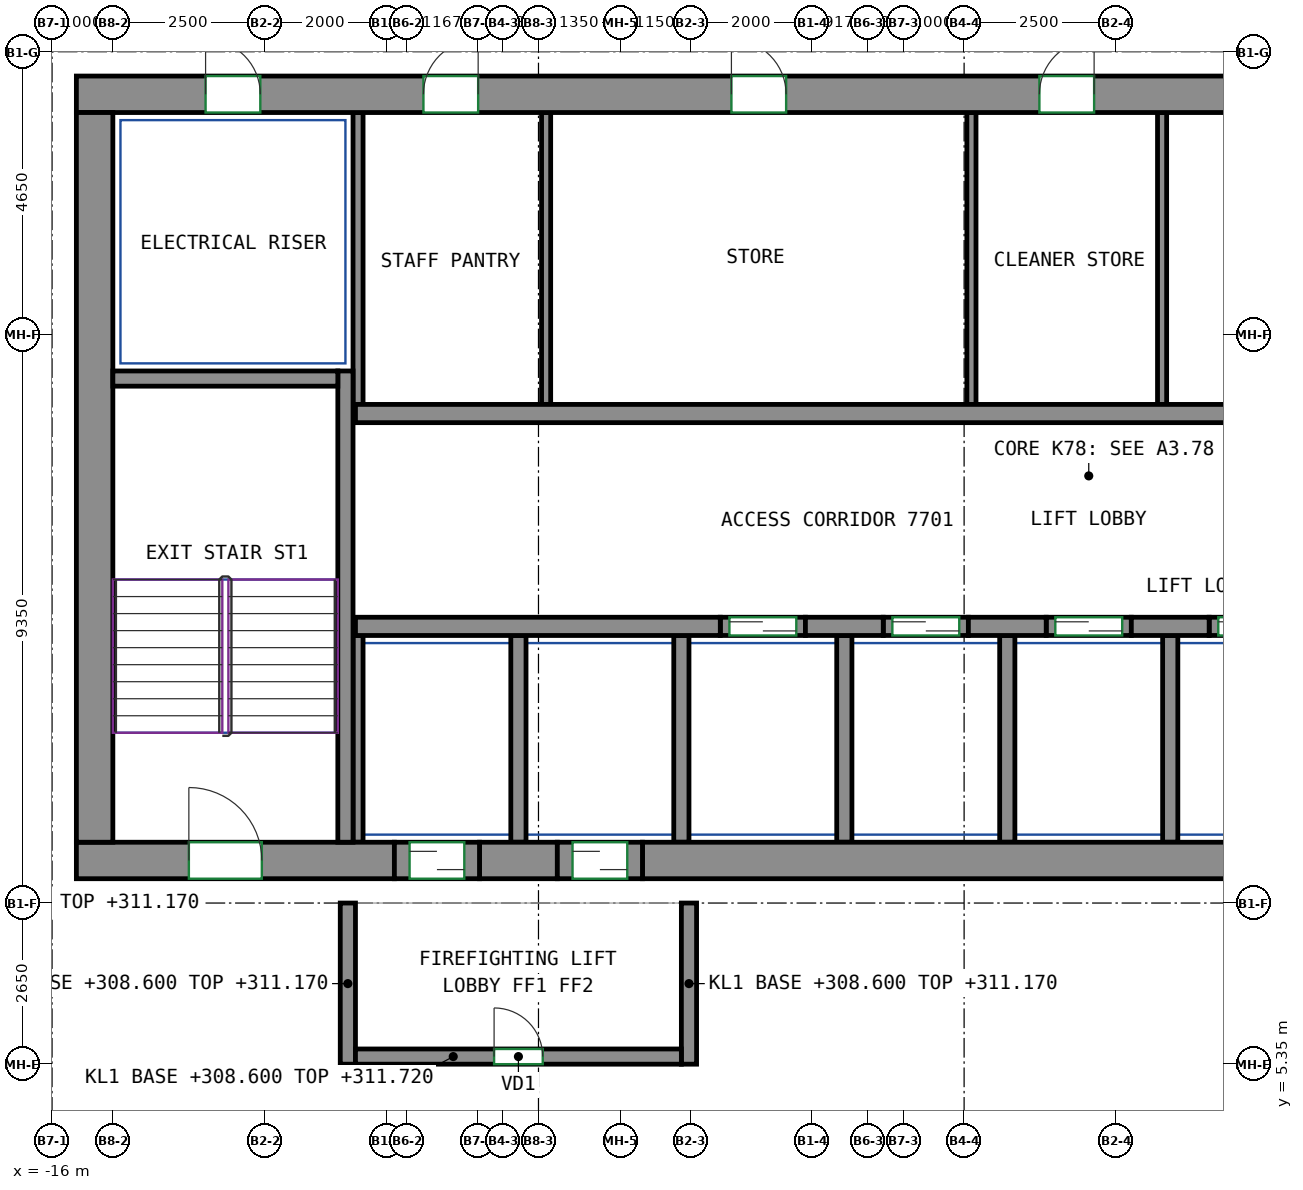
"""IFC4 building model, lengths in metres.
Left out: names, types, materials, properties, quantities, classifications, styles, units other than length and angle.
Written with IfcOpenShell. Run it as: python <this file> out.ifc"""

import sys

from ifc_helpers import new_model, si_unit, direction, frame, frame_2d, origin, place, context, subcontext, project, spatial, rectangle, extrude, source, transform, mapped, element, fill, save


model = new_model("IFC4")
c1 = context("Model", 3, precision=1e-05, world=origin(), true_north=direction((0.0, 1.0)))
c2 = subcontext(c1, "Body", "Model", "MODEL_VIEW")
j1 = project(units=[si_unit("LENGTHUNIT", "METRE"), si_unit("PLANEANGLEUNIT", "RADIAN")], contexts=[c1])
p1 = place(None, origin())
s1 = spatial("IfcSite", under=j1, at=p1, CompositionType="ELEMENT")
p2 = place(p1, origin())
s2 = spatial("IfcBuilding", under=s1, at=p2, CompositionType="ELEMENT")
p3 = place(p2, frame((0.0, 0.0, 308.6)))
s3 = spatial("IfcBuildingStorey", under=s2, at=p3, CompositionType="ELEMENT", Elevation=308.6)
m1 = source(origin(), c2, "Body", "SweptSolid", [
    extrude(rectangle(XDim=5.23, YDim=0.6, at=frame_2d((2.615, 0.0))), origin(), (0.0, 0.0, 1.0), 3.12),
])
p4 = place(p3, frame((-15.6, 8.7, 0.0), z_axis=(0.0, 0.0, 1.0), x_axis=(1.0, 0.0, 0.0)))
e1 = element("IfcWall", 1, at=p4, inside=s3, PredefinedType="SHEAR", context=c2, shape_type="MappedRepresentation", body=[
    mapped(m1, transform((0.0, 0.0, 0.0))),
])
p5 = place(p4, frame((1.85, 0.0, 0.0)))
e2 = element("IfcOpeningElement", 2, at=p5, cuts=e1, PredefinedType="OPENING", context=c2, shape_type="SweptSolid", body=[
    extrude(rectangle(XDim=1.2, YDim=2.1, at=frame_2d((0.6, 1.05))), frame((0.0, 0.31, 0.0), z_axis=(0.0, -1.0, 0.0), x_axis=(1.0, 0.0, 0.0)), (0.0, 0.0, 1.0), 0.62),
])
m2 = source(origin(), c2, "Body", "SweptSolid", [
    extrude(rectangle(XDim=1.28, YDim=0.6, at=frame_2d((0.64, 0.0))), origin(), (0.0, 0.0, 1.0), 3.12),
])
p6 = place(p3, frame((-8.97, 8.7, 0.0), z_axis=(0.0, 0.0, 1.0), x_axis=(1.0, 0.0, 0.0)))
e3 = element("IfcWall", 3, at=p6, inside=s3, PredefinedType="SHEAR", context=c2, shape_type="MappedRepresentation", body=[
    mapped(m2, transform((0.0, 0.0, 0.0))),
])
m3 = source(origin(), c2, "Body", "SweptSolid", [
    extrude(rectangle(XDim=14.18, YDim=0.6, at=frame_2d((7.09, 0.0))), origin(), (0.0, 0.0, 1.0), 3.12),
])
p7 = place(p3, frame((-6.29, 8.7, 0.0), z_axis=(0.0, 0.0, 1.0), x_axis=(1.0, 0.0, 0.0)))
e4 = element("IfcWall", 4, at=p7, inside=s3, PredefinedType="SHEAR", context=c2, shape_type="MappedRepresentation", body=[
    mapped(m3, transform((0.0, 0.0, 0.0))),
])
m4 = source(origin(), c2, "Body", "SweptSolid", [
    extrude(rectangle(XDim=33.3, YDim=0.6, at=frame_2d((16.65, 0.0))), origin(), (0.0, 0.0, 1.0), 3.12),
])
p8 = place(p3, frame((-15.6, 21.3, 0.0), z_axis=(0.0, 0.0, 1.0), x_axis=(1.0, 0.0, 0.0)))
e5 = element("IfcWall", 5, at=p8, inside=s3, PredefinedType="SHEAR", context=c2, shape_type="MappedRepresentation", body=[
    mapped(m4, transform((0.0, 0.0, 0.0))),
])
p9 = place(p8, frame((5.708, 0.0, 0.0)))
e6 = element("IfcOpeningElement", 6, at=p9, cuts=e5, PredefinedType="OPENING", context=c2, shape_type="SweptSolid", body=[
    extrude(rectangle(XDim=0.9, YDim=2.1, at=frame_2d((0.45, 1.05))), frame((0.0, 0.31, 0.0), z_axis=(0.0, -1.0, 0.0), x_axis=(1.0, 0.0, 0.0)), (0.0, 0.0, 1.0), 0.62),
])
p10 = place(p8, frame((10.773, 0.0, 0.0)))
e7 = element("IfcOpeningElement", 7, at=p10, cuts=e5, PredefinedType="OPENING", context=c2, shape_type="SweptSolid", body=[
    extrude(rectangle(XDim=0.9, YDim=2.1, at=frame_2d((0.45, 1.05))), frame((0.0, 0.31, 0.0), z_axis=(0.0, -1.0, 0.0), x_axis=(1.0, 0.0, 0.0)), (0.0, 0.0, 1.0), 0.62),
])
p11 = place(p8, frame((15.838, 0.0, 0.0)))
e8 = element("IfcOpeningElement", 8, at=p11, cuts=e5, PredefinedType="OPENING", context=c2, shape_type="SweptSolid", body=[
    extrude(rectangle(XDim=0.9, YDim=2.1, at=frame_2d((0.45, 1.05))), frame((0.0, 0.31, 0.0), z_axis=(0.0, -1.0, 0.0), x_axis=(1.0, 0.0, 0.0)), (0.0, 0.0, 1.0), 0.62),
])
p12 = place(p8, frame((21.493, 0.0, 0.0)))
e9 = element("IfcOpeningElement", 9, at=p12, cuts=e5, PredefinedType="OPENING", context=c2, shape_type="SweptSolid", body=[
    extrude(rectangle(XDim=0.9, YDim=2.1, at=frame_2d((0.45, 1.05))), frame((0.0, 0.31, 0.0), z_axis=(0.0, -1.0, 0.0), x_axis=(1.0, 0.0, 0.0)), (0.0, 0.0, 1.0), 0.62),
])
p13 = place(p8, frame((26.92, 0.0, 0.0)))
e10 = element("IfcOpeningElement", 10, at=p13, cuts=e5, PredefinedType="OPENING", context=c2, shape_type="SweptSolid", body=[
    extrude(rectangle(XDim=0.9, YDim=2.1, at=frame_2d((0.45, 1.05))), frame((0.0, 0.31, 0.0), z_axis=(0.0, -1.0, 0.0), x_axis=(1.0, 0.0, 0.0)), (0.0, 0.0, 1.0), 0.62),
])
p14 = place(p8, frame((2.125, 0.0, 0.0)))
e11 = element("IfcOpeningElement", 11, at=p14, cuts=e5, PredefinedType="OPENING", context=c2, shape_type="SweptSolid", body=[
    extrude(rectangle(XDim=0.9, YDim=2.1, at=frame_2d((0.45, 1.05))), frame((0.0, 0.31, 0.0), z_axis=(0.0, -1.0, 0.0), x_axis=(1.0, 0.0, 0.0)), (0.0, 0.0, 1.0), 0.62),
])
p15 = place(p8, frame((30.275, 0.0, 0.0)))
e12 = element("IfcOpeningElement", 12, at=p15, cuts=e5, PredefinedType="OPENING", context=c2, shape_type="SweptSolid", body=[
    extrude(rectangle(XDim=0.9, YDim=2.1, at=frame_2d((0.45, 1.05))), frame((0.0, 0.31, 0.0), z_axis=(0.0, -1.0, 0.0), x_axis=(1.0, 0.0, 0.0)), (0.0, 0.0, 1.0), 0.62),
])
m5 = source(origin(), c2, "Body", "SweptSolid", [
    extrude(rectangle(XDim=12.0, YDim=0.6, at=frame_2d((6.0, 0.0))), origin(), (0.0, 0.0, 1.0), 3.12),
])
p16 = place(p3, frame((-15.3, 9.0, 0.0), z_axis=(0.0, 0.0, 1.0), x_axis=(0.0, 1.0, 0.0)))
e13 = element("IfcWall", 13, at=p16, inside=s3, PredefinedType="SHEAR", context=c2, shape_type="MappedRepresentation", body=[
    mapped(m5, transform((0.0, 0.0, 0.0))),
])
m6 = source(origin(), c2, "Body", "SweptSolid", [
    extrude(rectangle(XDim=7.75, YDim=0.25, at=frame_2d((3.875, 0.0))), origin(), (0.0, 0.0, 1.0), 3.12),
])
p17 = place(p3, frame((-11.175, 9.0, 0.0), z_axis=(0.0, 0.0, 1.0), x_axis=(0.0, 1.0, 0.0)))
e14 = element("IfcWall", 14, at=p17, inside=s3, PredefinedType="SHEAR", context=c2, shape_type="MappedRepresentation", body=[
    mapped(m6, transform((0.0, 0.0, 0.0))),
])
m7 = source(origin(), c2, "Body", "SweptSolid", [
    extrude(rectangle(XDim=3.7, YDim=0.25, at=frame_2d((1.85, 0.0))), origin(), (0.0, 0.0, 1.0), 3.12),
])
p18 = place(p3, frame((-15.0, 16.625, 0.0), z_axis=(0.0, 0.0, 1.0), x_axis=(1.0, 0.0, 0.0)))
e15 = element("IfcWall", 15, at=p18, inside=s3, PredefinedType="SHEAR", context=c2, shape_type="MappedRepresentation", body=[
    mapped(m7, transform((0.0, 0.0, 0.0))),
])
m8 = source(origin(), c2, "Body", "SweptSolid", [
    extrude(rectangle(XDim=6.0, YDim=0.3, at=frame_2d((3.0, 0.0))), origin(), (0.0, 0.0, 1.0), 3.12),
])
p19 = place(p3, frame((-11.01, 12.55, 0.0), z_axis=(0.0, 0.0, 1.0), x_axis=(1.0, 0.0, 0.0)))
e16 = element("IfcWall", 16, at=p19, inside=s3, PredefinedType="SHEAR", context=c2, shape_type="MappedRepresentation", body=[
    mapped(m8, transform((0.0, 0.0, 0.0))),
])
m9 = source(origin(), c2, "Body", "SweptSolid", [
    extrude(rectangle(XDim=1.28, YDim=0.3, at=frame_2d((0.64, 0.0))), origin(), (0.0, 0.0, 1.0), 3.12),
])
for number, where, z_axis, x_axis in (
    (17, (-3.61, 12.55, 0.0), (0.0, 0.0, 1.0), (1.0, 0.0, 0.0)),
    (18, (-0.93, 12.55, 0.0), (0.0, 0.0, 1.0), (1.0, 0.0, 0.0)),
    (19, (1.75, 12.55, 0.0), (0.0, 0.0, 1.0), (1.0, 0.0, 0.0)),
):
    element("IfcWall", number, at=place(p3, frame(where, z_axis=z_axis, x_axis=x_axis)), inside=s3, PredefinedType="SHEAR", context=c2, shape_type="MappedRepresentation", body=[
        mapped(m9, transform((0.0, 0.0, 0.0))),
    ])
m10 = source(origin(), c2, "Body", "SweptSolid", [
    extrude(rectangle(XDim=22.08, YDim=0.3, at=frame_2d((11.04, 0.0))), origin(), (0.0, 0.0, 1.0), 3.12),
])
p20 = place(p3, frame((-11.01, 16.05, 0.0), z_axis=(0.0, 0.0, 1.0), x_axis=(1.0, 0.0, 0.0)))
e20 = element("IfcWall", 20, at=p20, inside=s3, PredefinedType="SHEAR", context=c2, shape_type="MappedRepresentation", body=[
    mapped(m10, transform((0.0, 0.0, 0.0))),
])
m11 = source(origin(), c2, "Body", "SweptSolid", [
    extrude(rectangle(XDim=1.4, YDim=0.3, at=frame_2d((0.7, 0.0))), origin(), (0.0, 0.0, 1.0), 3.12),
])
p21 = place(p3, frame((-5.01, 12.55, 0.0), z_axis=(0.0, 0.0, 1.0), x_axis=(1.0, 0.0, 0.0)))
e21 = element("IfcWall", 21, at=p21, inside=s3, PredefinedType="PARTITIONING", context=c2, shape_type="MappedRepresentation", body=[
    mapped(m11, transform((0.0, 0.0, 0.0))),
])
p22 = place(p21, frame((0.15, 0.0, 0.0)))
e22 = element("IfcOpeningElement", 22, at=p22, cuts=e21, PredefinedType="OPENING", context=c2, shape_type="SweptSolid", body=[
    extrude(rectangle(XDim=1.1, YDim=2.1, at=frame_2d((0.55, 1.05))), frame((0.0, 0.16, 0.0), z_axis=(0.0, -1.0, 0.0), x_axis=(1.0, 0.0, 0.0)), (0.0, 0.0, 1.0), 0.32),
])
m12 = source(origin(), c2, "Body", "SweptSolid", [
    extrude(rectangle(XDim=1.4, YDim=0.3, at=frame_2d((0.7, 0.0))), origin(), (0.0, 0.0, 1.0), 3.12),
])
p23 = place(p3, frame((-2.33, 12.55, 0.0), z_axis=(0.0, 0.0, 1.0), x_axis=(1.0, 0.0, 0.0)))
e23 = element("IfcWall", 23, at=p23, inside=s3, PredefinedType="PARTITIONING", context=c2, shape_type="MappedRepresentation", body=[
    mapped(m12, transform((0.0, 0.0, 0.0))),
])
p24 = place(p23, frame((0.15, 0.0, 0.0)))
e24 = element("IfcOpeningElement", 24, at=p24, cuts=e23, PredefinedType="OPENING", context=c2, shape_type="SweptSolid", body=[
    extrude(rectangle(XDim=1.1, YDim=2.1, at=frame_2d((0.55, 1.05))), frame((0.0, 0.16, 0.0), z_axis=(0.0, -1.0, 0.0), x_axis=(1.0, 0.0, 0.0)), (0.0, 0.0, 1.0), 0.32),
])
p25 = place(p3, frame((0.35, 12.55, 0.0), z_axis=(0.0, 0.0, 1.0), x_axis=(1.0, 0.0, 0.0)))
e25 = element("IfcWall", 25, at=p25, inside=s3, PredefinedType="PARTITIONING", context=c2, shape_type="MappedRepresentation", body=[
    mapped(m11, transform((0.0, 0.0, 0.0))),
])
p26 = place(p25, frame((0.15, 0.0, 0.0)))
e26 = element("IfcOpeningElement", 26, at=p26, cuts=e25, PredefinedType="OPENING", context=c2, shape_type="SweptSolid", body=[
    extrude(rectangle(XDim=1.1, YDim=2.1, at=frame_2d((0.55, 1.05))), frame((0.0, 0.16, 0.0), z_axis=(0.0, -1.0, 0.0), x_axis=(1.0, 0.0, 0.0)), (0.0, 0.0, 1.0), 0.32),
])
p27 = place(p3, frame((3.03, 12.55, 0.0), z_axis=(0.0, 0.0, 1.0), x_axis=(1.0, 0.0, 0.0)))
e27 = element("IfcWall", 27, at=p27, inside=s3, PredefinedType="PARTITIONING", context=c2, shape_type="MappedRepresentation", body=[
    mapped(m11, transform((0.0, 0.0, 0.0))),
])
p28 = place(p27, frame((0.15, 0.0, 0.0)))
e28 = element("IfcOpeningElement", 28, at=p28, cuts=e27, PredefinedType="OPENING", context=c2, shape_type="SweptSolid", body=[
    extrude(rectangle(XDim=1.1, YDim=2.1, at=frame_2d((0.55, 1.05))), frame((0.0, 0.16, 0.0), z_axis=(0.0, -1.0, 0.0), x_axis=(1.0, 0.0, 0.0)), (0.0, 0.0, 1.0), 0.32),
])
m13 = source(origin(), c2, "Body", "SweptSolid", [
    extrude(rectangle(XDim=2.65, YDim=0.25, at=frame_2d((1.325, 0.0))), origin(), (0.0, 0.0, 1.0), 2.57),
])
for number, where, z_axis, x_axis in (
    (29, (-11.135, 5.35, 0.0), (0.0, 0.0, 1.0), (0.0, 1.0, 0.0)),
    (30, (-5.525, 5.35, 0.0), (0.0, 0.0, 1.0), (0.0, 1.0, 0.0)),
):
    element("IfcWall", number, at=place(p3, frame(where, z_axis=z_axis, x_axis=x_axis)), inside=s3, PredefinedType="PARTITIONING", context=c2, shape_type="MappedRepresentation", body=[
        mapped(m13, transform((0.0, 0.0, 0.0))),
    ])
m14 = source(origin(), c2, "Body", "SweptSolid", [
    extrude(rectangle(XDim=5.36, YDim=0.25, at=frame_2d((2.68, 0.0))), origin(), (0.0, 0.0, 1.0), 3.12),
])
p29 = place(p3, frame((-11.01, 5.475, 0.0), z_axis=(0.0, 0.0, 1.0), x_axis=(1.0, 0.0, 0.0)))
e31 = element("IfcWall", 31, at=p29, inside=s3, PredefinedType="PARTITIONING", context=c2, shape_type="MappedRepresentation", body=[
    mapped(m14, transform((0.0, 0.0, 0.0))),
])
p30 = place(p29, frame((2.28, 0.0, 0.0)))
e32 = element("IfcOpeningElement", 32, at=p30, cuts=e31, PredefinedType="OPENING", context=c2, shape_type="SweptSolid", body=[
    extrude(rectangle(XDim=0.8, YDim=2.0, at=frame_2d((0.4, 1.0))), frame((0.0, 0.135, 0.0), z_axis=(0.0, -1.0, 0.0), x_axis=(1.0, 0.0, 0.0)), (0.0, 0.0, 1.0), 0.27),
])
m15 = source(origin(), c2, "Body", "SweptSolid", [
    extrude(rectangle(XDim=4.8, YDim=0.165, at=frame_2d((2.4, 0.0))), origin(), (0.0, 0.0, 1.0), 3.12),
])
p31 = place(p3, frame((-10.968, 16.2, 0.0), z_axis=(0.0, 0.0, 1.0), x_axis=(0.0, 1.0, 0.0)))
e33 = element("IfcWall", 33, at=p31, inside=s3, PredefinedType="PARTITIONING", context=c2, shape_type="MappedRepresentation", body=[
    mapped(m15, transform((0.0, 0.0, 0.0))),
])
m16 = source(origin(), c2, "Body", "SweptSolid", [
    extrude(rectangle(XDim=3.4, YDim=0.25, at=frame_2d((1.7, 0.0))), origin(), (0.0, 0.0, 1.0), 3.12),
])
for number, where, z_axis, x_axis in (
    (34, (2.39, 9.0, 0.0), (0.0, 0.0, 1.0), (0.0, 1.0, 0.0)),
    (35, (-0.29, 9.0, 0.0), (0.0, 0.0, 1.0), (0.0, 1.0, 0.0)),
):
    element("IfcWall", number, at=place(p3, frame(where, z_axis=z_axis, x_axis=x_axis)), inside=s3, PredefinedType="PARTITIONING", context=c2, shape_type="MappedRepresentation", body=[
        mapped(m16, transform((0.0, 0.0, 0.0))),
    ])
m17 = source(origin(), c2, "Body", "SweptSolid", [
    extrude(rectangle(XDim=3.4, YDim=0.165, at=frame_2d((1.7, 0.0))), origin(), (0.0, 0.0, 1.0), 3.12),
])
p32 = place(p3, frame((-10.968, 9.0, 0.0), z_axis=(0.0, 0.0, 1.0), x_axis=(0.0, 1.0, 0.0)))
e36 = element("IfcWall", 36, at=p32, inside=s3, PredefinedType="PARTITIONING", context=c2, shape_type="MappedRepresentation", body=[
    mapped(m17, transform((0.0, 0.0, 0.0))),
])
for number, where, z_axis, x_axis in (
    (37, (-2.97, 9.0, 0.0), (0.0, 0.0, 1.0), (0.0, 1.0, 0.0)),
    (38, (-5.65, 9.0, 0.0), (0.0, 0.0, 1.0), (0.0, 1.0, 0.0)),
    (39, (-8.33, 9.0, 0.0), (0.0, 0.0, 1.0), (0.0, 1.0, 0.0)),
):
    element("IfcWall", number, at=place(p3, frame(where, z_axis=z_axis, x_axis=x_axis)), inside=s3, PredefinedType="PARTITIONING", context=c2, shape_type="MappedRepresentation", body=[
        mapped(m16, transform((0.0, 0.0, 0.0))),
    ])
m18 = source(origin(), c2, "Body", "SweptSolid", [
    extrude(rectangle(XDim=4.8, YDim=0.15, at=frame_2d((2.4, 0.0))), origin(), (0.0, 0.0, 1.0), 3.12),
])
for number, where, z_axis, x_axis in (
    (40, (-7.875, 16.2, 0.0), (0.0, 0.0, 1.0), (0.0, 1.0, 0.0)),
    (41, (-0.88, 16.2, 0.0), (0.0, 0.0, 1.0), (0.0, 1.0, 0.0)),
    (42, (2.256, 16.2, 0.0), (0.0, 0.0, 1.0), (0.0, 1.0, 0.0)),
):
    element("IfcWall", number, at=place(p3, frame(where, z_axis=z_axis, x_axis=x_axis)), inside=s3, PredefinedType="PARTITIONING", context=c2, shape_type="MappedRepresentation", body=[
        mapped(m18, transform((0.0, 0.0, 0.0))),
    ])
m19 = source(origin(), c2, "Body", "SweptSolid", [
    extrude(rectangle(XDim=1.4, YDim=0.6, at=frame_2d((0.7, 0.0))), origin(), (0.0, 0.0, 1.0), 2.7),
])
p33 = place(p3, frame((-10.37, 8.7, 0.0), z_axis=(0.0, 0.0, 1.0), x_axis=(1.0, 0.0, 0.0)))
e43 = element("IfcWall", 43, at=p33, inside=s3, PredefinedType="PARTITIONING", context=c2, shape_type="MappedRepresentation", body=[
    mapped(m19, transform((0.0, 0.0, 0.0))),
])
p34 = place(p33, frame((0.25, 0.0, 0.0)))
e44 = element("IfcOpeningElement", 44, at=p34, cuts=e43, PredefinedType="OPENING", context=c2, shape_type="SweptSolid", body=[
    extrude(rectangle(XDim=0.9, YDim=2.1, at=frame_2d((0.45, 1.05))), frame((0.0, 0.31, 0.0), z_axis=(0.0, -1.0, 0.0), x_axis=(1.0, 0.0, 0.0)), (0.0, 0.0, 1.0), 0.62),
])
m20 = source(origin(), c2, "Body", "SweptSolid", [
    extrude(rectangle(XDim=1.4, YDim=0.6, at=frame_2d((0.7, 0.0))), origin(), (0.0, 0.0, 1.0), 2.7),
])
p35 = place(p3, frame((-7.69, 8.7, 0.0), z_axis=(0.0, 0.0, 1.0), x_axis=(1.0, 0.0, 0.0)))
e45 = element("IfcWall", 45, at=p35, inside=s3, PredefinedType="PARTITIONING", context=c2, shape_type="MappedRepresentation", body=[
    mapped(m20, transform((0.0, 0.0, 0.0))),
])
p36 = place(p35, frame((0.25, 0.0, 0.0)))
e46 = element("IfcOpeningElement", 46, at=p36, cuts=e45, PredefinedType="OPENING", context=c2, shape_type="SweptSolid", body=[
    extrude(rectangle(XDim=0.9, YDim=2.1, at=frame_2d((0.45, 1.05))), frame((0.0, 0.31, 0.0), z_axis=(0.0, -1.0, 0.0), x_axis=(1.0, 0.0, 0.0)), (0.0, 0.0, 1.0), 0.62),
])
p37 = place(p30, origin())
e47 = element("IfcDoor", 47, at=p37, inside=s3, OperationType="SINGLE_SWING_LEFT", PredefinedType="DOOR", context=c2, shape_type="SweptSolid", body=[
    extrude(rectangle(XDim=0.8, YDim=2.0, at=frame_2d((0.4, 1.0))), frame((0.0, 0.025, 0.0), z_axis=(0.0, -1.0, 0.0), x_axis=(1.0, 0.0, 0.0)), (0.0, 0.0, 1.0), 0.05),
])
fill(e32, e47)
p38 = place(p34, origin())
e48 = element("IfcDoor", 48, at=p38, inside=s3, OperationType="SLIDING_TO_LEFT", PredefinedType="DOOR", context=c2, shape_type="SweptSolid", body=[
    extrude(rectangle(XDim=0.9, YDim=2.1, at=frame_2d((0.45, 1.05))), frame((0.0, 0.205, 0.0), z_axis=(0.0, -1.0, 0.0), x_axis=(1.0, 0.0, 0.0)), (0.0, 0.0, 1.0), 0.05),
])
fill(e44, e48)
p39 = place(p36, origin())
e49 = element("IfcDoor", 49, at=p39, inside=s3, OperationType="SLIDING_TO_RIGHT", PredefinedType="DOOR", context=c2, shape_type="SweptSolid", body=[
    extrude(rectangle(XDim=0.9, YDim=2.1, at=frame_2d((0.45, 1.05))), frame((0.0, 0.205, 0.0), z_axis=(0.0, -1.0, 0.0), x_axis=(1.0, 0.0, 0.0)), (0.0, 0.0, 1.0), 0.05),
])
fill(e46, e49)
p40 = place(p22, origin())
e50 = element("IfcDoor", 50, at=p40, inside=s3, OperationType="DOUBLE_DOOR_SLIDING", PredefinedType="DOOR", context=c2, shape_type="SweptSolid", body=[
    extrude(rectangle(XDim=1.1, YDim=2.1, at=frame_2d((0.55, 1.05))), frame((0.0, 0.025, 0.0), z_axis=(0.0, -1.0, 0.0), x_axis=(1.0, 0.0, 0.0)), (0.0, 0.0, 1.0), 0.05),
])
fill(e22, e50)
p41 = place(p24, origin())
e51 = element("IfcDoor", 51, at=p41, inside=s3, OperationType="DOUBLE_DOOR_SLIDING", PredefinedType="DOOR", context=c2, shape_type="SweptSolid", body=[
    extrude(rectangle(XDim=1.1, YDim=2.1, at=frame_2d((0.55, 1.05))), frame((0.0, 0.025, 0.0), z_axis=(0.0, -1.0, 0.0), x_axis=(1.0, 0.0, 0.0)), (0.0, 0.0, 1.0), 0.05),
])
fill(e24, e51)
p42 = place(p26, origin())
e52 = element("IfcDoor", 52, at=p42, inside=s3, OperationType="DOUBLE_DOOR_SLIDING", PredefinedType="DOOR", context=c2, shape_type="SweptSolid", body=[
    extrude(rectangle(XDim=1.1, YDim=2.1, at=frame_2d((0.55, 1.05))), frame((0.0, 0.025, 0.0), z_axis=(0.0, -1.0, 0.0), x_axis=(1.0, 0.0, 0.0)), (0.0, 0.0, 1.0), 0.05),
])
fill(e26, e52)
p43 = place(p28, origin())
e53 = element("IfcDoor", 53, at=p43, inside=s3, OperationType="DOUBLE_DOOR_SLIDING", PredefinedType="DOOR", context=c2, shape_type="SweptSolid", body=[
    extrude(rectangle(XDim=1.1, YDim=2.1, at=frame_2d((0.55, 1.05))), frame((0.0, 0.025, 0.0), z_axis=(0.0, -1.0, 0.0), x_axis=(1.0, 0.0, 0.0)), (0.0, 0.0, 1.0), 0.05),
])
fill(e28, e53)
p44 = place(p9, origin())
e54 = element("IfcDoor", 54, at=p44, inside=s3, OperationType="SINGLE_SWING_RIGHT", PredefinedType="DOOR", context=c2, shape_type="SweptSolid", body=[
    extrude(rectangle(XDim=0.9, YDim=2.1, at=frame_2d((0.45, 1.05))), frame((0.0, -0.155, 0.0), z_axis=(0.0, -1.0, 0.0), x_axis=(1.0, 0.0, 0.0)), (0.0, 0.0, 1.0), 0.05),
])
fill(e6, e54)
p45 = place(p10, origin())
e55 = element("IfcDoor", 55, at=p45, inside=s3, OperationType="SINGLE_SWING_LEFT", PredefinedType="DOOR", context=c2, shape_type="SweptSolid", body=[
    extrude(rectangle(XDim=0.9, YDim=2.1, at=frame_2d((0.45, 1.05))), frame((0.0, -0.155, 0.0), z_axis=(0.0, -1.0, 0.0), x_axis=(1.0, 0.0, 0.0)), (0.0, 0.0, 1.0), 0.05),
])
fill(e7, e55)
p46 = place(p11, origin())
e56 = element("IfcDoor", 56, at=p46, inside=s3, OperationType="SINGLE_SWING_RIGHT", PredefinedType="DOOR", context=c2, shape_type="SweptSolid", body=[
    extrude(rectangle(XDim=0.9, YDim=2.1, at=frame_2d((0.45, 1.05))), frame((0.0, -0.155, 0.0), z_axis=(0.0, -1.0, 0.0), x_axis=(1.0, 0.0, 0.0)), (0.0, 0.0, 1.0), 0.05),
])
fill(e8, e56)
p47 = place(p14, origin())
e57 = element("IfcDoor", 57, at=p47, inside=s3, OperationType="SINGLE_SWING_LEFT", PredefinedType="DOOR", context=c2, shape_type="SweptSolid", body=[
    extrude(rectangle(XDim=0.9, YDim=2.1, at=frame_2d((0.45, 1.05))), frame((0.0, -0.155, 0.0), z_axis=(0.0, -1.0, 0.0), x_axis=(1.0, 0.0, 0.0)), (0.0, 0.0, 1.0), 0.05),
])
fill(e11, e57)
p48 = place(p5, origin())
e58 = element("IfcDoor", 58, at=p48, inside=s3, OperationType="DOUBLE_DOOR_SINGLE_SWING", PredefinedType="DOOR", context=c2, shape_type="SweptSolid", body=[
    extrude(rectangle(XDim=1.2, YDim=2.1, at=frame_2d((0.6, 1.05))), frame((0.0, 0.205, 0.0), z_axis=(0.0, -1.0, 0.0), x_axis=(1.0, 0.0, 0.0)), (0.0, 0.0, 1.0), 0.05),
])
fill(e2, e58)
save(model, sys.argv[1])
